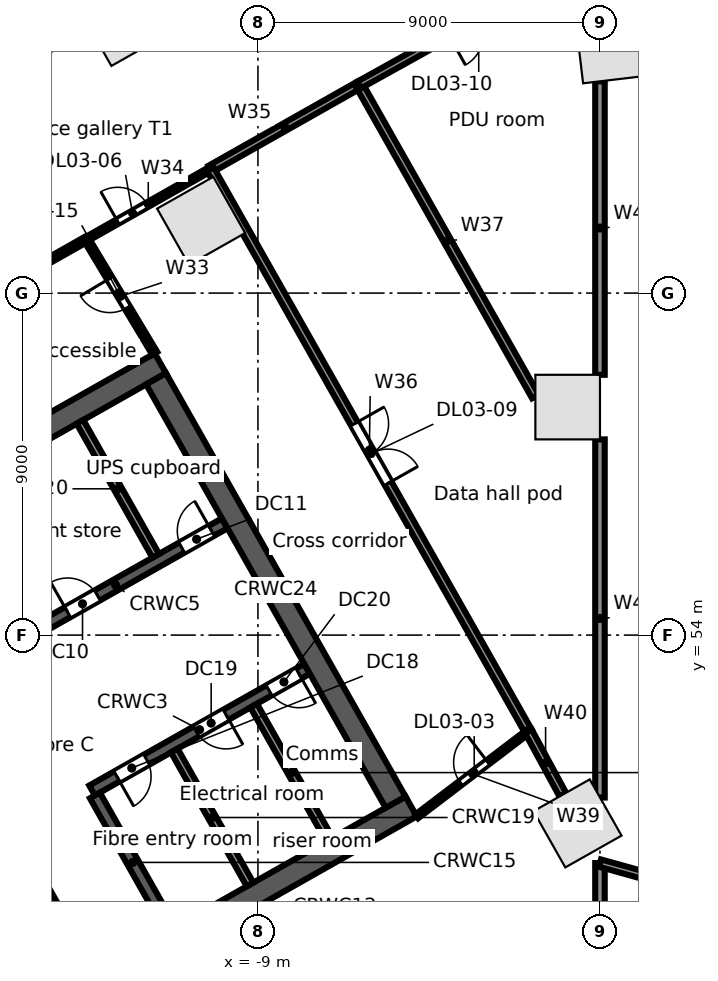
"""IFC4 building model, lengths in metres.
Left out: names, types, materials, properties, quantities, classifications, styles, units other than length and angle.
Written with IfcOpenShell. Run it as: python <this file> out.ifc"""

import sys

from ifc_helpers import new_model, si_unit, direction, frame, frame_2d, origin, origin_2d, place, context, subcontext, project, spatial, rectangle, extrude, element, fill, save


model = new_model("IFC4")
c1 = context("Model", 3, precision=1e-05, world=origin(), true_north=direction((0.0, 1.0)))
c2 = subcontext(c1, "Body", "Model", "MODEL_VIEW")
j1 = project(units=[si_unit("LENGTHUNIT", "METRE"), si_unit("PLANEANGLEUNIT", "RADIAN")], contexts=[c1])
p1 = place(None, origin())
s1 = spatial("IfcSite", under=j1, at=p1, CompositionType="ELEMENT")
p2 = place(p1, origin())
s2 = spatial("IfcBuilding", under=s1, at=p2, CompositionType="ELEMENT")
p3 = place(p2, frame((0.0, 0.0, 21.5)))
s3 = spatial("IfcBuildingStorey", under=s2, at=p3, CompositionType="ELEMENT", Elevation=21.5)
for number, where, z_axis, x_axis in (
    (1, (0.3, 69.464, 0.0), (0.0, 0.0, 1.0), (-0.993, -0.118, 0.0)),
    (2, (-10.495, 64.902, 0.0), (0.0, 0.0, 1.0), (-0.87, -0.492, 0.0)),
    (3, (-0.591, 49.044, 0.0), (0.0, 0.0, 1.0), (0.87, 0.492, 0.0)),
    (4, (-0.85, 60.0, 0.0), (0.0, 0.0, 1.0), (0.0, 1.0, 0.0)),
):
    element("IfcColumn", number, at=place(p3, frame(where, z_axis=z_axis, x_axis=x_axis)), inside=s3, PredefinedType="COLUMN", context=c2, shape_type="SweptSolid", body=[
        extrude(rectangle(XDim=1.7, YDim=1.7, at=origin_2d()), origin(), (0.0, 0.0, 1.0), 5.0),
    ])
p4 = place(p3, frame((-12.667, 69.659, 0.0), z_axis=(0.0, 0.0, 1.0), x_axis=(-0.87035569594, -0.492423560103, 0.0)))
e5 = element("IfcColumn", 5, at=p4, inside=s3, PredefinedType="COLUMN", context=c2, shape_type="SweptSolid", body=[
    extrude(rectangle(XDim=1.0, YDim=1.0, at=origin_2d()), origin(), (0.0, 0.0, 1.0), 4.68),
])
p5 = place(p3, frame((-63.707, 41.701, 0.0), z_axis=(0.0, 0.0, 1.0), x_axis=(0.870355510268, 0.492423888277, 0.0)))
e6 = element("IfcWall", 6, at=p5, inside=s3, PredefinedType="STANDARD", context=c2, shape_type="SweptSolid", body=[
    extrude(rectangle(XDim=67.903, YDim=0.3, at=frame_2d((33.952, 0.0))), origin(), (0.0, 0.0, 1.0), 4.68),
])
p6 = place(p3, frame((-18.024, 42.104, 0.0), z_axis=(0.0, 0.0, 1.0), x_axis=(0.870360574057, 0.492414937962, 0.0)))
e7 = element("IfcWall", 7, at=p6, inside=s3, PredefinedType="SOLIDWALL", context=c2, shape_type="SweptSolid", body=[
    extrude(rectangle(XDim=15.0, YDim=0.6, at=frame_2d((7.5, 0.0))), origin(), (0.0, 0.0, 1.0), 4.68),
])
p7 = place(p6, frame((6.1, 0.0, 0.0)))
e8 = element("IfcOpeningElement", 8, at=p7, cuts=e7, PredefinedType="OPENING", context=c2, shape_type="SweptSolid", body=[
    extrude(rectangle(XDim=1.2, YDim=2.1, at=frame_2d((0.6, 1.05))), frame((0.0, 0.31, 0.0), z_axis=(0.0, -1.0, 0.0), x_axis=(1.0, 0.0, 0.0)), (0.0, 0.0, 1.0), 0.62),
])
p8 = place(p3, frame((-13.365, 49.911, 0.0), z_axis=(0.0, 0.0, 1.0), x_axis=(0.870340995471, 0.49244954219, 0.0)))
e9 = element("IfcWall", 9, at=p8, inside=s3, PredefinedType="SOLIDWALL", context=c2, shape_type="SweptSolid", body=[
    extrude(rectangle(XDim=6.5, YDim=0.3, at=frame_2d((3.25, 0.0))), origin(), (0.0, 0.0, 1.0), 4.68),
])
p9 = place(p8, frame((0.75, 0.0, 0.0)))
e10 = element("IfcOpeningElement", 10, at=p9, cuts=e9, PredefinedType="OPENING", context=c2, shape_type="SweptSolid", body=[
    extrude(rectangle(XDim=0.9, YDim=2.1, at=frame_2d((0.45, 1.05))), frame((0.0, 0.16, 0.0), z_axis=(0.0, -1.0, 0.0), x_axis=(1.0, 0.0, 0.0)), (0.0, 0.0, 1.0), 0.32),
])
p10 = place(p8, frame((3.15, 0.0, 0.0)))
e11 = element("IfcOpeningElement", 11, at=p10, cuts=e9, PredefinedType="OPENING", context=c2, shape_type="SweptSolid", body=[
    extrude(rectangle(XDim=0.9, YDim=2.1, at=frame_2d((0.45, 1.05))), frame((0.0, 0.16, 0.0), z_axis=(0.0, -1.0, 0.0), x_axis=(1.0, 0.0, 0.0)), (0.0, 0.0, 1.0), 0.32),
])
p11 = place(p8, frame((5.35, 0.0, 0.0)))
e12 = element("IfcOpeningElement", 12, at=p11, cuts=e9, PredefinedType="OPENING", context=c2, shape_type="SweptSolid", body=[
    extrude(rectangle(XDim=0.9, YDim=2.1, at=frame_2d((0.45, 1.05))), frame((0.0, 0.16, 0.0), z_axis=(0.0, -1.0, 0.0), x_axis=(1.0, 0.0, 0.0)), (0.0, 0.0, 1.0), 0.32),
])
p12 = place(p3, frame((-15.618, 53.691, 0.0), z_axis=(0.0, 0.0, 1.0), x_axis=(0.870356769198, 0.492421663121, 0.0)))
e13 = element("IfcWall", 13, at=p12, inside=s3, PredefinedType="SOLIDWALL", context=c2, shape_type="SweptSolid", body=[
    extrude(rectangle(XDim=6.6, YDim=0.3, at=frame_2d((3.3, 0.0))), origin(), (0.0, 0.0, 1.0), 4.68),
])
p13 = place(p12, frame((1.85, 0.0, 0.0)))
e14 = element("IfcOpeningElement", 14, at=p13, cuts=e13, PredefinedType="OPENING", context=c2, shape_type="SweptSolid", body=[
    extrude(rectangle(XDim=0.9, YDim=2.1, at=frame_2d((0.45, 1.05))), frame((0.0, 0.16, 0.0), z_axis=(0.0, -1.0, 0.0), x_axis=(1.0, 0.0, 0.0)), (0.0, 0.0, 1.0), 0.32),
])
p14 = place(p12, frame((5.3, 0.0, 0.0)))
e15 = element("IfcOpeningElement", 15, at=p14, cuts=e13, PredefinedType="OPENING", context=c2, shape_type="SweptSolid", body=[
    extrude(rectangle(XDim=0.9, YDim=2.1, at=frame_2d((0.45, 1.05))), frame((0.0, 0.16, 0.0), z_axis=(0.0, -1.0, 0.0), x_axis=(1.0, 0.0, 0.0)), (0.0, 0.0, 1.0), 0.32),
])
p15 = place(p3, frame((-24.623, 53.767, 0.0), z_axis=(0.0, 0.0, 1.0), x_axis=(0.870356627484, 0.492421913601, 0.0)))
e16 = element("IfcWall", 16, at=p15, inside=s3, PredefinedType="SOLIDWALL", context=c2, shape_type="SweptSolid", body=[
    extrude(rectangle(XDim=15.0, YDim=0.6, at=frame_2d((7.5, 0.0))), origin(), (0.0, 0.0, 1.0), 4.68),
])
p16 = place(p3, frame((-16.076, 48.205, 0.0), z_axis=(0.0, 0.0, 1.0), x_axis=(0.492394910396, -0.870371904542, 0.0)))
e17 = element("IfcWall", 17, at=p16, inside=s3, PredefinedType="SOLIDWALL", context=c2, shape_type="SweptSolid", body=[
    extrude(rectangle(XDim=4.05, YDim=0.2, at=frame_2d((2.025, 0.0))), origin(), (0.0, 0.0, 1.0), 4.68),
])
for number, where, z_axis, x_axis in (
    (18, (-15.379, 48.599, 0.0), (0.0, 0.0, 1.0), (0.492, -0.87, 0.0)),
    (19, (-13.291, 49.781, 0.0), (0.0, 0.0, 1.0), (0.492, -0.87, 0.0)),
):
    element("IfcWall", number, at=place(p3, frame(where, z_axis=z_axis, x_axis=x_axis)), inside=s3, PredefinedType="SOLIDWALL", context=c2, shape_type="SweptSolid", body=[
        extrude(rectangle(XDim=4.05, YDim=0.3, at=frame_2d((2.025, 0.0))), origin(), (0.0, 0.0, 1.0), 4.68),
    ])
for number, where, z_axis, x_axis in (
    (20, (-11.202, 50.962, 0.0), (0.0, 0.0, 1.0), (0.492, -0.87, 0.0)),
    (21, (-13.683, 59.612, 0.0), (0.0, 0.0, 1.0), (0.492, -0.87, 0.0)),
):
    element("IfcWall", number, at=place(p3, frame(where, z_axis=z_axis, x_axis=x_axis)), inside=s3, PredefinedType="PARTITIONING", context=c2, shape_type="SweptSolid", body=[
        extrude(rectangle(XDim=4.05, YDim=0.2, at=frame_2d((2.025, 0.0))), origin(), (0.0, 0.0, 1.0), 4.68),
    ])
p17 = place(p3, frame((-9.113, 52.144, 0.0), z_axis=(0.0, 0.0, 1.0), x_axis=(0.492394910396, -0.870371904542, 0.0)))
e22 = element("IfcWall", 22, at=p17, inside=s3, PredefinedType="PARTITIONING", context=c2, shape_type="SweptSolid", body=[
    extrude(rectangle(XDim=4.05, YDim=0.2, at=frame_2d((2.025, 0.0))), origin(), (0.0, 0.0, 1.0), 4.68),
])
p18 = place(p3, frame((-11.681, 60.744, 0.0), z_axis=(0.0, 0.0, 1.0), x_axis=(0.492426772896, -0.870353878221, 0.0)))
e23 = element("IfcWall", 23, at=p18, inside=s3, PredefinedType="SOLIDWALL", context=c2, shape_type="SweptSolid", body=[
    extrude(rectangle(XDim=12.8, YDim=0.6, at=frame_2d((6.4, 0.0))), origin(), (0.0, 0.0, 1.0), 4.68),
])
p19 = place(p3, frame((-16.346, 62.816, 0.0), z_axis=(0.0, 0.0, 1.0), x_axis=(0.870334637055, 0.492460779699, 0.0)))
e24 = element("IfcWall", 24, at=p19, inside=s3, PredefinedType="PARTITIONING", context=c2, shape_type="SweptSolid", body=[
    extrude(rectangle(XDim=3.249, YDim=0.15, at=frame_2d((1.625, 0.0))), origin(), (0.0, 0.0, 1.0), 4.68),
])
p20 = place(p3, frame((-13.518, 64.416, 0.0), z_axis=(0.0, 0.0, 1.0), x_axis=(0.514875058642, -0.857265229663, 0.0)))
e25 = element("IfcWall", 25, at=p20, inside=s3, PredefinedType="PARTITIONING", context=c2, shape_type="SweptSolid", body=[
    extrude(rectangle(XDim=3.502, YDim=0.15, at=frame_2d((1.751, 0.0))), origin(), (0.0, 0.0, 1.0), 3.96),
])
p21 = place(p20, frame((1.2, 0.0, 0.0)))
e26 = element("IfcOpeningElement", 26, at=p21, cuts=e25, PredefinedType="OPENING", context=c2, shape_type="SweptSolid", body=[
    extrude(rectangle(XDim=0.9, YDim=2.1, at=frame_2d((0.45, 1.05))), frame((0.0, 0.085, 0.0), z_axis=(0.0, -1.0, 0.0), x_axis=(1.0, 0.0, 0.0)), (0.0, 0.0, 1.0), 0.17),
])
p22 = place(p3, frame((-13.518, 64.416, 0.0), z_axis=(0.0, 0.0, 1.0), x_axis=(0.870338454914, 0.492454032268, 0.0)))
e27 = element("IfcWall", 27, at=p22, inside=s3, PredefinedType="PARTITIONING", context=c2, shape_type="SweptSolid", body=[
    extrude(rectangle(XDim=3.75, YDim=0.125, at=frame_2d((1.875, 0.0))), origin(), (0.0, 0.0, 1.0), 3.742),
])
p23 = place(p22, frame((0.95, 0.0, 0.0)))
e28 = element("IfcOpeningElement", 28, at=p23, cuts=e27, PredefinedType="OPENING", context=c2, shape_type="SweptSolid", body=[
    extrude(rectangle(XDim=0.9, YDim=2.1, at=frame_2d((0.45, 1.05))), frame((0.0, 0.073, 0.0), z_axis=(0.0, -1.0, 0.0), x_axis=(1.0, 0.0, 0.0)), (0.0, 0.0, 1.0), 0.145),
])
p24 = place(p3, frame((-10.254, 66.263, 0.0), z_axis=(0.0, 0.0, 1.0), x_axis=(0.870454697906, 0.492248533664, 0.0)))
e29 = element("IfcWall", 29, at=p24, inside=s3, PredefinedType="PARTITIONING", context=c2, shape_type="SweptSolid", body=[
    extrude(rectangle(XDim=4.5, YDim=0.2, at=frame_2d((2.25, 0.0))), origin(), (0.0, 0.0, 1.0), 4.68),
])
p25 = place(p3, frame((-10.254, 66.263, 0.0), z_axis=(0.0, 0.0, 1.0), x_axis=(0.492411664329, -0.870362426138, 0.0)))
e30 = element("IfcWall", 30, at=p25, inside=s3, PredefinedType="PARTITIONING", context=c2, shape_type="SweptSolid", body=[
    extrude(rectangle(XDim=17.0, YDim=0.2, at=frame_2d((8.5, 0.0))), origin(), (0.0, 0.0, 1.0), 3.742),
])
p26 = place(p25, frame((7.7, 0.0, 0.0)))
e31 = element("IfcOpeningElement", 31, at=p26, cuts=e30, PredefinedType="OPENING", context=c2, shape_type="SweptSolid", body=[
    extrude(rectangle(XDim=1.8, YDim=2.1, at=frame_2d((0.9, 1.05))), frame((0.0, 0.11, 0.0), z_axis=(0.0, -1.0, 0.0), x_axis=(1.0, 0.0, 0.0)), (0.0, 0.0, 1.0), 0.22),
])
p27 = place(p3, frame((-6.337, 68.478, 0.0), z_axis=(0.0, 0.0, 1.0), x_axis=(0.492412602502, -0.870361895361, 0.0)))
e32 = element("IfcWall", 32, at=p27, inside=s3, PredefinedType="PARTITIONING", context=c2, shape_type="SweptSolid", body=[
    extrude(rectangle(XDim=9.417, YDim=0.2, at=frame_2d((4.708, 0.0))), origin(), (0.0, 0.0, 1.0), 3.742),
])
p28 = place(p3, frame((-6.337, 68.478, 0.0), z_axis=(0.0, 0.0, 1.0), x_axis=(0.87407148623, 0.485797320864, 0.0)))
e33 = element("IfcWall", 33, at=p28, inside=s3, PredefinedType="PARTITIONING", context=c2, shape_type="SweptSolid", body=[
    extrude(rectangle(XDim=7.25, YDim=0.2, at=frame_2d((3.625, 0.0))), origin(), (0.0, 0.0, 1.0), 3.96),
])
p29 = place(p28, frame((2.7, 0.0, 0.0)))
e34 = element("IfcOpeningElement", 34, at=p29, cuts=e33, PredefinedType="OPENING", context=c2, shape_type="SweptSolid", body=[
    extrude(rectangle(XDim=1.8, YDim=2.1, at=frame_2d((0.9, 1.05))), frame((0.0, 0.11, 0.0), z_axis=(0.0, -1.0, 0.0), x_axis=(1.0, 0.0, 0.0)), (0.0, 0.0, 1.0), 0.22),
])
p30 = place(p3, frame((-4.821, 49.23, 0.0), z_axis=(0.0, 0.0, 1.0), x_axis=(0.795615322848, 0.605802160816, 0.0)))
e35 = element("IfcWall", 35, at=p30, inside=s3, PredefinedType="PARTITIONING", context=c2, shape_type="SweptSolid", body=[
    extrude(rectangle(XDim=3.693, YDim=0.125, at=frame_2d((1.846, 0.0))), origin(), (0.0, 0.0, 1.0), 4.68),
])
p31 = place(p30, frame((1.45, 0.0, 0.0)))
e36 = element("IfcOpeningElement", 36, at=p31, cuts=e35, PredefinedType="OPENING", context=c2, shape_type="SweptSolid", body=[
    extrude(rectangle(XDim=0.9, YDim=2.1, at=frame_2d((0.45, 1.05))), frame((0.0, 0.073, 0.0), z_axis=(0.0, -1.0, 0.0), x_axis=(1.0, 0.0, 0.0)), (0.0, 0.0, 1.0), 0.145),
])
p32 = place(p3, frame((-1.883, 51.467, 0.0), z_axis=(0.0, 0.0, 1.0), x_axis=(0.477162952876, -0.878814836244, 0.0)))
e37 = element("IfcWall", 37, at=p32, inside=s3, PredefinedType="PARTITIONING", context=c2, shape_type="SweptSolid", body=[
    extrude(rectangle(XDim=1.895, YDim=0.2, at=frame_2d((0.947, 0.0))), origin(), (0.0, 0.0, 1.0), 4.68),
])
p33 = place(p3, frame((0.0, 43.806, 0.0), z_axis=(0.0, 0.0, 1.0), x_axis=(0.0, 1.0, 0.0)))
e38 = element("IfcWall", 38, at=p33, inside=s3, PredefinedType="PARTITIONING", context=c2, shape_type="SweptSolid", body=[
    extrude(rectangle(XDim=4.194, YDim=0.25, at=frame_2d((2.097, 0.0))), origin(), (0.0, 0.0, 1.0), 3.742),
])
p34 = place(p33, frame((1.2, 0.0, 0.0)))
e39 = element("IfcOpeningElement", 39, at=p34, cuts=e38, PredefinedType="OPENING", context=c2, shape_type="SweptSolid", body=[
    extrude(rectangle(XDim=1.8, YDim=2.1, at=frame_2d((0.9, 1.05))), frame((0.0, 0.135, 0.0), z_axis=(0.0, -1.0, 0.0), x_axis=(1.0, 0.0, 0.0)), (0.0, 0.0, 1.0), 0.27),
])
p35 = place(p3, frame((0.0, 48.0, 0.0), z_axis=(0.0, 0.0, 1.0), x_axis=(0.963400508162, -0.268066150181, 0.0)))
e40 = element("IfcWall", 40, at=p35, inside=s3, PredefinedType="PARTITIONING", context=c2, shape_type="SweptSolid", body=[
    extrude(rectangle(XDim=4.443, YDim=0.2, at=frame_2d((2.221, 0.0))), origin(), (0.0, 0.0, 1.0), 4.68),
])
p36 = place(p3, frame((0.0, 49.726, 0.0), z_axis=(0.0, 0.0, 1.0), x_axis=(0.0, 1.0, 0.0)))
e41 = element("IfcWall", 41, at=p36, inside=s3, PredefinedType="PARTITIONING", context=c2, shape_type="SweptSolid", body=[
    extrude(rectangle(XDim=9.424, YDim=0.25, at=frame_2d((4.712, 0.0))), origin(), (0.0, 0.0, 1.0), 4.68),
])
p37 = place(p3, frame((0.0, 60.85, 0.0), z_axis=(0.0, 0.0, 1.0), x_axis=(0.0, 1.0, 0.0)))
e42 = element("IfcWall", 42, at=p37, inside=s3, PredefinedType="PARTITIONING", context=c2, shape_type="SweptSolid", body=[
    extrude(rectangle(XDim=7.723, YDim=0.25, at=frame_2d((3.861, 0.0))), origin(), (0.0, 0.0, 1.0), 3.952),
])
p38 = place(p3, frame((0.0, 72.0, 0.0), z_axis=(0.0, 0.0, 1.0), x_axis=(0.960375968852, -0.278707729443, 0.0)))
e43 = element("IfcWall", 43, at=p38, inside=s3, PredefinedType="PARTITIONING", context=c2, shape_type="SweptSolid", body=[
    extrude(rectangle(XDim=11.058, YDim=0.2, at=frame_2d((5.529, 0.0))), origin(), (0.0, 0.0, 1.0), 3.742),
])
p39 = place(p38, frame((4.7, 0.0, 0.0)))
e44 = element("IfcOpeningElement", 44, at=p39, cuts=e43, PredefinedType="OPENING", context=c2, shape_type="SweptSolid", body=[
    extrude(rectangle(XDim=1.8, YDim=2.1, at=frame_2d((0.9, 1.05))), frame((0.0, 0.11, 0.0), z_axis=(0.0, -1.0, 0.0), x_axis=(1.0, 0.0, 0.0)), (0.0, 0.0, 1.0), 0.22),
])
p40 = place(p13, origin())
e45 = element("IfcDoor", 45, at=p40, inside=s3, OperationType="SINGLE_SWING_LEFT", PredefinedType="DOOR", context=c2, shape_type="SweptSolid", body=[
    extrude(rectangle(XDim=0.9, YDim=2.1, at=frame_2d((0.45, 1.05))), frame((0.0, 0.025, 0.0), z_axis=(0.0, -1.0, 0.0), x_axis=(1.0, 0.0, 0.0)), (0.0, 0.0, 1.0), 0.05),
])
fill(e14, e45)
p41 = place(p14, origin())
e46 = element("IfcDoor", 46, at=p41, inside=s3, OperationType="SINGLE_SWING_RIGHT", PredefinedType="DOOR", context=c2, shape_type="SweptSolid", body=[
    extrude(rectangle(XDim=0.9, YDim=2.1, at=frame_2d((0.45, 1.05))), frame((0.0, 0.025, 0.0), z_axis=(0.0, -1.0, 0.0), x_axis=(1.0, 0.0, 0.0)), (0.0, 0.0, 1.0), 0.05),
])
fill(e15, e46)
p42 = place(p9, frame((0.9, 0.0, 0.0), z_axis=(0.0, 0.0, 1.0), x_axis=(-1.0, 0.0, 0.0)))
e47 = element("IfcDoor", 47, at=p42, inside=s3, OperationType="SINGLE_SWING_RIGHT", PredefinedType="DOOR", context=c2, shape_type="SweptSolid", body=[
    extrude(rectangle(XDim=0.9, YDim=2.1, at=frame_2d((0.45, 1.05))), frame((0.0, 0.025, 0.0), z_axis=(0.0, -1.0, 0.0), x_axis=(1.0, 0.0, 0.0)), (0.0, 0.0, 1.0), 0.05),
])
fill(e10, e47)
p43 = place(p10, frame((0.9, 0.0, 0.0), z_axis=(0.0, 0.0, 1.0), x_axis=(-1.0, 0.0, 0.0)))
e48 = element("IfcDoor", 48, at=p43, inside=s3, OperationType="SINGLE_SWING_LEFT", PredefinedType="DOOR", context=c2, shape_type="SweptSolid", body=[
    extrude(rectangle(XDim=0.9, YDim=2.1, at=frame_2d((0.45, 1.05))), frame((0.0, 0.025, 0.0), z_axis=(0.0, -1.0, 0.0), x_axis=(1.0, 0.0, 0.0)), (0.0, 0.0, 1.0), 0.05),
])
fill(e11, e48)
p44 = place(p11, frame((0.9, 0.0, 0.0), z_axis=(0.0, 0.0, 1.0), x_axis=(-1.0, 0.0, 0.0)))
e49 = element("IfcDoor", 49, at=p44, inside=s3, OperationType="SINGLE_SWING_LEFT", PredefinedType="DOOR", context=c2, shape_type="SweptSolid", body=[
    extrude(rectangle(XDim=0.9, YDim=2.1, at=frame_2d((0.45, 1.05))), frame((0.0, 0.025, 0.0), z_axis=(0.0, -1.0, 0.0), x_axis=(1.0, 0.0, 0.0)), (0.0, 0.0, 1.0), 0.05),
])
fill(e12, e49)
p45 = place(p31, origin())
e50 = element("IfcDoor", 50, at=p45, inside=s3, OperationType="SINGLE_SWING_RIGHT", PredefinedType="DOOR", context=c2, shape_type="SweptSolid", body=[
    extrude(rectangle(XDim=0.9, YDim=2.1, at=frame_2d((0.45, 1.05))), frame((0.0, 0.025, 0.0), z_axis=(0.0, -1.0, 0.0), x_axis=(1.0, 0.0, 0.0)), (0.0, 0.0, 1.0), 0.05),
])
fill(e36, e50)
p46 = place(p23, origin())
e51 = element("IfcDoor", 51, at=p46, inside=s3, OperationType="SINGLE_SWING_LEFT", PredefinedType="DOOR", context=c2, shape_type="SweptSolid", body=[
    extrude(rectangle(XDim=0.9, YDim=2.1, at=frame_2d((0.45, 1.05))), frame((0.0, 0.025, 0.0), z_axis=(0.0, -1.0, 0.0), x_axis=(1.0, 0.0, 0.0)), (0.0, 0.0, 1.0), 0.05),
])
fill(e28, e51)
p47 = place(p26, origin())
e52 = element("IfcDoor", 52, at=p47, inside=s3, OperationType="DOUBLE_DOOR_SINGLE_SWING", PredefinedType="DOOR", context=c2, shape_type="SweptSolid", body=[
    extrude(rectangle(XDim=1.8, YDim=2.1, at=frame_2d((0.9, 1.05))), frame((0.0, 0.025, 0.0), z_axis=(0.0, -1.0, 0.0), x_axis=(1.0, 0.0, 0.0)), (0.0, 0.0, 1.0), 0.05),
])
fill(e31, e52)
p48 = place(p21, frame((0.9, 0.0, 0.0), z_axis=(0.0, 0.0, 1.0), x_axis=(-1.0, 0.0, 0.0)))
e53 = element("IfcDoor", 53, at=p48, inside=s3, OperationType="SINGLE_SWING_RIGHT", PredefinedType="DOOR", context=c2, shape_type="SweptSolid", body=[
    extrude(rectangle(XDim=0.9, YDim=2.1, at=frame_2d((0.45, 1.05))), frame((0.0, 0.025, 0.0), z_axis=(0.0, -1.0, 0.0), x_axis=(1.0, 0.0, 0.0)), (0.0, 0.0, 1.0), 0.05),
])
fill(e26, e53)
save(model, sys.argv[1])
